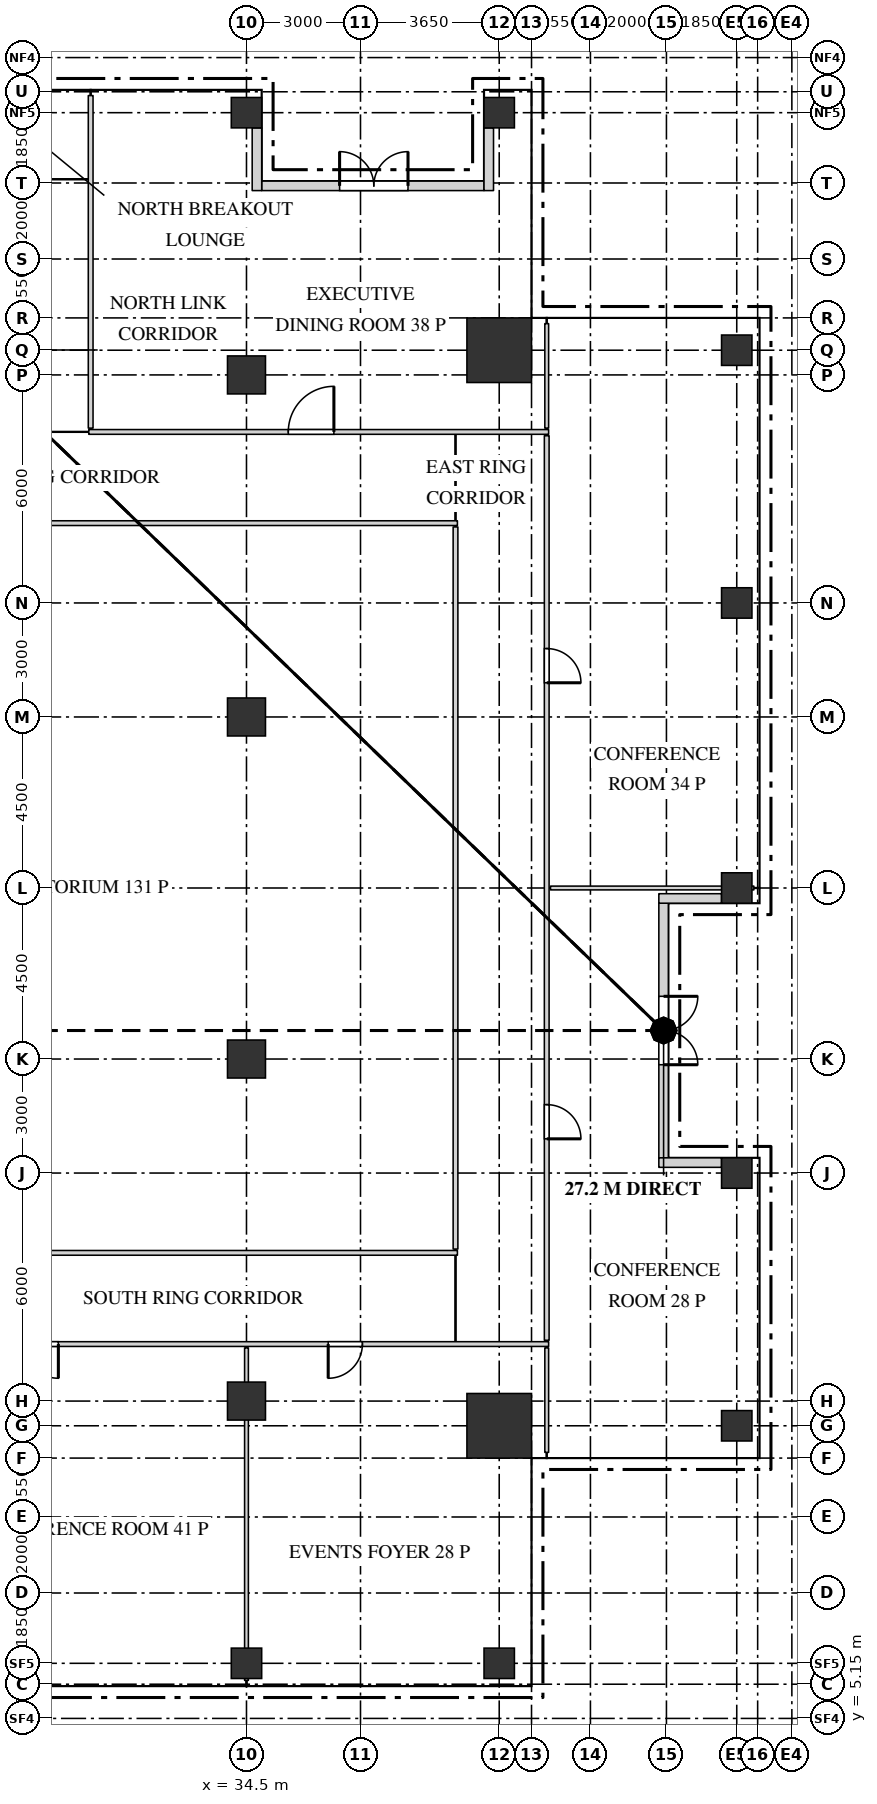
"""IFC4 building model, lengths in metres.
Left out: names, types, materials, properties, quantities, classifications, styles, units other than length and angle.
Written with IfcOpenShell. Run it as: python <this file> out.ifc"""

import sys

from ifc_helpers import new_model, si_unit, direction, frame, frame_2d, origin, origin_2d, place, context, subcontext, project, spatial, rectangle, extrude, source, transform, mapped, element, fill, save


model = new_model("IFC4")
c1 = context("Model", 3, precision=1e-05, world=origin(), true_north=direction((0.0, 1.0)))
c2 = subcontext(c1, "Body", "Model", "MODEL_VIEW")
j1 = project(units=[si_unit("LENGTHUNIT", "METRE"), si_unit("PLANEANGLEUNIT", "RADIAN")], contexts=[c1])
p1 = place(None, origin())
s1 = spatial("IfcSite", under=j1, at=p1, CompositionType="ELEMENT")
p2 = place(p1, origin())
s2 = spatial("IfcBuilding", under=s1, at=p2, CompositionType="ELEMENT")
p3 = place(p2, frame((0.0, 0.0, 318.2)))
s3 = spatial("IfcBuildingStorey", under=s2, at=p3, CompositionType="ELEMENT", Elevation=318.2)
m1 = source(origin(), c2, "Body", "SweptSolid", [
    extrude(rectangle(XDim=1.7, YDim=1.7, at=origin_2d()), origin(), (0.0, 0.0, 1.0), 3.75),
])
for number, where, z_axis, x_axis in (
    (1, (41.15, 41.15, 0.0), (0.0, 0.0, 1.0), (1.0, 0.0, 0.0)),
    (2, (41.15, 12.85, 0.0), (0.0, 0.0, 1.0), (1.0, 0.0, 0.0)),
):
    element("IfcColumn", number, at=place(p3, frame(where, z_axis=z_axis, x_axis=x_axis)), inside=s3, PredefinedType="COLUMN", context=c2, shape_type="MappedRepresentation", body=[
        mapped(m1, transform((0.0, 0.0, 0.0))),
    ])
m2 = source(origin(), c2, "Body", "SweptSolid", [
    extrude(rectangle(XDim=0.8, YDim=0.8, at=origin_2d()), origin(), (0.0, 0.0, 1.0), 3.75),
])
for number, where, z_axis, x_axis in (
    (3, (34.5, 6.6, 0.0), (0.0, 0.0, 1.0), (1.0, 0.0, 0.0)),
    (4, (41.15, 6.6, 0.0), (0.0, 0.0, 1.0), (1.0, 0.0, 0.0)),
    (5, (47.4, 12.85, 0.0), (0.0, 0.0, 1.0), (1.0, 0.0, 0.0)),
    (6, (47.4, 19.5, 0.0), (0.0, 0.0, 1.0), (1.0, 0.0, 0.0)),
    (7, (47.4, 27.0, 0.0), (0.0, 0.0, 1.0), (1.0, 0.0, 0.0)),
    (8, (47.4, 34.5, 0.0), (0.0, 0.0, 1.0), (1.0, 0.0, 0.0)),
    (9, (47.4, 41.15, 0.0), (0.0, 0.0, 1.0), (1.0, 0.0, 0.0)),
    (10, (34.5, 47.4, 0.0), (0.0, 0.0, 1.0), (1.0, 0.0, 0.0)),
    (11, (41.15, 47.4, 0.0), (0.0, 0.0, 1.0), (1.0, 0.0, 0.0)),
):
    element("IfcColumn", number, at=place(p3, frame(where, z_axis=z_axis, x_axis=x_axis)), inside=s3, PredefinedType="COLUMN", context=c2, shape_type="MappedRepresentation", body=[
        mapped(m2, transform((0.0, 0.0, 0.0))),
    ])
m3 = source(origin(), c2, "Body", "SweptSolid", [
    extrude(rectangle(XDim=1.0, YDim=1.0, at=origin_2d()), origin(), (0.0, 0.0, 1.0), 3.75),
])
for number, where, z_axis, x_axis in (
    (12, (34.5, 13.5, 0.0), (0.0, 0.0, 1.0), (1.0, 0.0, 0.0)),
    (13, (34.5, 22.5, 0.0), (0.0, 0.0, 1.0), (1.0, 0.0, 0.0)),
    (14, (34.5, 31.5, 0.0), (0.0, 0.0, 1.0), (1.0, 0.0, 0.0)),
    (15, (34.5, 40.5, 0.0), (0.0, 0.0, 1.0), (1.0, 0.0, 0.0)),
):
    element("IfcColumn", number, at=place(p3, frame(where, z_axis=z_axis, x_axis=x_axis)), inside=s3, PredefinedType="COLUMN", context=c2, shape_type="MappedRepresentation", body=[
        mapped(m3, transform((0.0, 0.0, 0.0))),
    ])
m4 = source(origin(), c2, "Body", "SweptSolid", [
    extrude(rectangle(XDim=6.7, YDim=0.25, at=frame_2d((3.35, 0.0))), origin(), (0.0, 0.0, 1.0), 3.2),
])
p4 = place(p3, frame((45.475, 19.9, 0.0), z_axis=(0.0, 0.0, 1.0), x_axis=(0.0, 1.0, 0.0)))
e16 = element("IfcWall", 16, at=p4, inside=s3, PredefinedType="SOLIDWALL", context=c2, shape_type="MappedRepresentation", body=[
    mapped(m4, transform((0.0, 0.0, 0.0))),
])
m5 = source(origin(), c2, "Body", "SweptSolid", [
    extrude(rectangle(XDim=1.85, YDim=2.4, at=frame_2d((0.925, 1.2))), frame((0.0, 0.135, 0.0), z_axis=(0.0, -1.0, 0.0), x_axis=(1.0, 0.0, 0.0)), (0.0, 0.0, 1.0), 0.27),
])
p5 = place(p4, frame((0.3, 0.0, 0.0)))
e17 = element("IfcOpeningElement", 17, at=p5, cuts=e16, PredefinedType="OPENING", context=c2, shape_type="MappedRepresentation", body=[
    mapped(m5, transform((0.0, 0.0, 0.0))),
])
p6 = place(p4, frame((4.55, 0.0, 0.0)))
e18 = element("IfcOpeningElement", 18, at=p6, cuts=e16, PredefinedType="OPENING", context=c2, shape_type="MappedRepresentation", body=[
    mapped(m5, transform((0.0, 0.0, 0.0))),
])
m6 = source(origin(), c2, "Body", "SweptSolid", [
    extrude(rectangle(XDim=1.8, YDim=2.4, at=frame_2d((0.9, 1.2))), frame((0.0, 0.135, 0.0), z_axis=(0.0, -1.0, 0.0), x_axis=(1.0, 0.0, 0.0)), (0.0, 0.0, 1.0), 0.27),
])
p7 = place(p4, frame((2.45, 0.0, 0.0)))
e19 = element("IfcOpeningElement", 19, at=p7, cuts=e16, PredefinedType="OPENING", context=c2, shape_type="MappedRepresentation", body=[
    mapped(m6, transform((0.0, 0.0, 0.0))),
])
m7 = source(origin(), c2, "Body", "SweptSolid", [
    extrude(rectangle(XDim=1.65, YDim=0.25, at=frame_2d((0.825, 0.0))), origin(), (0.0, 0.0, 1.0), 3.2),
])
for number, where, z_axis, x_axis in (
    (20, (47.0, 19.775, 0.0), (0.0, 0.0, 1.0), (-1.0, 0.0, 0.0)),
    (21, (47.0, 26.725, 0.0), (0.0, 0.0, 1.0), (-1.0, 0.0, 0.0)),
):
    element("IfcWall", number, at=place(p3, frame(where, z_axis=z_axis, x_axis=x_axis)), inside=s3, PredefinedType="SOLIDWALL", context=c2, shape_type="MappedRepresentation", body=[
        mapped(m7, transform((0.0, 0.0, 0.0))),
    ])
m8 = source(origin(), c2, "Body", "SweptSolid", [
    extrude(rectangle(XDim=5.85, YDim=0.25, at=frame_2d((2.925, 0.0))), origin(), (0.0, 0.0, 1.0), 3.75),
])
p8 = place(p3, frame((34.9, 45.475, 0.0), z_axis=(0.0, 0.0, 1.0), x_axis=(1.0, 0.0, 0.0)))
e22 = element("IfcWall", 22, at=p8, inside=s3, PredefinedType="SOLIDWALL", context=c2, shape_type="MappedRepresentation", body=[
    mapped(m8, transform((0.0, 0.0, 0.0))),
])
m9 = source(origin(), c2, "Body", "SweptSolid", [
    extrude(rectangle(XDim=1.4, YDim=2.4, at=frame_2d((0.7, 1.2))), frame((0.0, 0.135, 0.0), z_axis=(0.0, -1.0, 0.0), x_axis=(1.0, 0.0, 0.0)), (0.0, 0.0, 1.0), 0.27),
])
p9 = place(p8, frame((0.35, 0.0, 0.0)))
e23 = element("IfcOpeningElement", 23, at=p9, cuts=e22, PredefinedType="OPENING", context=c2, shape_type="MappedRepresentation", body=[
    mapped(m9, transform((0.0, 0.0, 0.0))),
])
p10 = place(p8, frame((4.15, 0.0, 0.0)))
e24 = element("IfcOpeningElement", 24, at=p10, cuts=e22, PredefinedType="OPENING", context=c2, shape_type="MappedRepresentation", body=[
    mapped(m9, transform((0.0, 0.0, 0.0))),
])
p11 = place(p8, frame((2.05, 0.0, 0.0)))
e25 = element("IfcOpeningElement", 25, at=p11, cuts=e22, PredefinedType="OPENING", context=c2, shape_type="MappedRepresentation", body=[
    mapped(m6, transform((0.0, 0.0, 0.0))),
])
m10 = source(origin(), c2, "Body", "SweptSolid", [
    extrude(rectangle(XDim=1.65, YDim=0.25, at=frame_2d((0.825, 0.0))), origin(), (0.0, 0.0, 1.0), 3.45),
])
for number, where, z_axis, x_axis in (
    (26, (34.775, 47.0, 0.0), (0.0, 0.0, 1.0), (0.0, -1.0, 0.0)),
    (27, (40.875, 47.0, 0.0), (0.0, 0.0, 1.0), (0.0, -1.0, 0.0)),
):
    element("IfcWall", number, at=place(p3, frame(where, z_axis=z_axis, x_axis=x_axis)), inside=s3, PredefinedType="SOLIDWALL", context=c2, shape_type="MappedRepresentation", body=[
        mapped(m10, transform((0.0, 0.0, 0.0))),
    ])
m11 = source(origin(), c2, "Body", "SweptSolid", [
    extrude(rectangle(XDim=8.75, YDim=0.1, at=frame_2d((4.375, 0.0))), origin(), (0.0, 0.0, 1.0), 3.35),
])
p12 = place(p3, frame((34.5, 6.15, 0.0), z_axis=(0.0, 0.0, 1.0), x_axis=(0.0, 1.0, 0.0)))
e28 = element("IfcWall", 28, at=p12, inside=s3, PredefinedType="PARTITIONING", context=c2, shape_type="MappedRepresentation", body=[
    mapped(m11, transform((0.0, 0.0, 0.0))),
])
m12 = source(origin(), c2, "Body", "SweptSolid", [
    extrude(rectangle(XDim=2.75, YDim=0.1, at=frame_2d((1.375, 0.0))), origin(), (0.0, 0.0, 1.0), 3.8),
])
p13 = place(p3, frame((42.4, 12.15, 0.0), z_axis=(0.0, 0.0, 1.0), x_axis=(0.0, 1.0, 0.0)))
e29 = element("IfcWall", 29, at=p13, inside=s3, PredefinedType="PARTITIONING", context=c2, shape_type="MappedRepresentation", body=[
    mapped(m12, transform((0.0, 0.0, 0.0))),
])
m13 = source(origin(), c2, "Body", "SweptSolid", [
    extrude(rectangle(XDim=19.1, YDim=0.125, at=frame_2d((9.55, 0.0))), origin(), (0.0, 0.0, 1.0), 3.8),
])
p14 = place(p3, frame((23.35, 15.0, 0.0), z_axis=(0.0, 0.0, 1.0), x_axis=(1.0, 0.0, 0.0)))
e30 = element("IfcWall", 30, at=p14, inside=s3, PredefinedType="PARTITIONING", context=c2, shape_type="MappedRepresentation", body=[
    mapped(m13, transform((0.0, 0.0, 0.0))),
])
m14 = source(origin(), c2, "Body", "SweptSolid", [
    extrude(rectangle(XDim=0.9, YDim=2.1, at=frame_2d((0.45, 1.05))), frame((0.0, 0.073, 0.0), z_axis=(0.0, -1.0, 0.0), x_axis=(1.0, 0.0, 0.0)), (0.0, 0.0, 1.0), 0.145),
])
p15 = place(p14, frame((5.3, 0.0, 0.0)))
e31 = element("IfcOpeningElement", 31, at=p15, cuts=e30, PredefinedType="OPENING", context=c2, shape_type="MappedRepresentation", body=[
    mapped(m14, transform((0.0, 0.0, 0.0))),
])
p16 = place(p14, frame((13.3, 0.0, 0.0)))
e32 = element("IfcOpeningElement", 32, at=p16, cuts=e30, PredefinedType="OPENING", context=c2, shape_type="MappedRepresentation", body=[
    mapped(m14, transform((0.0, 0.0, 0.0))),
])
m15 = source(origin(), c2, "Body", "SweptSolid", [
    extrude(rectangle(XDim=23.8, YDim=0.125, at=frame_2d((11.9, 0.0))), origin(), (0.0, 0.0, 1.0), 3.8),
])
p17 = place(p3, frame((42.4, 15.1, 0.0), z_axis=(0.0, 0.0, 1.0), x_axis=(0.0, 1.0, 0.0)))
e33 = element("IfcWall", 33, at=p17, inside=s3, PredefinedType="PARTITIONING", context=c2, shape_type="MappedRepresentation", body=[
    mapped(m15, transform((0.0, 0.0, 0.0))),
])
p18 = place(p17, frame((5.3, 0.0, 0.0)))
e34 = element("IfcOpeningElement", 34, at=p18, cuts=e33, PredefinedType="OPENING", context=c2, shape_type="MappedRepresentation", body=[
    mapped(m14, transform((0.0, 0.0, 0.0))),
])
p19 = place(p17, frame((17.3, 0.0, 0.0)))
e35 = element("IfcOpeningElement", 35, at=p19, cuts=e33, PredefinedType="OPENING", context=c2, shape_type="MappedRepresentation", body=[
    mapped(m14, transform((0.0, 0.0, 0.0))),
])
m16 = source(origin(), c2, "Body", "SweptSolid", [
    extrude(rectangle(XDim=16.7, YDim=0.125, at=frame_2d((8.35, 0.0))), origin(), (0.0, 0.0, 1.0), 3.8),
])
p20 = place(p3, frame((23.35, 17.4, 0.0), z_axis=(0.0, 0.0, 1.0), x_axis=(1.0, 0.0, 0.0)))
e36 = element("IfcWall", 36, at=p20, inside=s3, PredefinedType="PARTITIONING", context=c2, shape_type="MappedRepresentation", body=[
    mapped(m16, transform((0.0, 0.0, 0.0))),
])
m17 = source(origin(), c2, "Body", "SweptSolid", [
    extrude(rectangle(XDim=19.0, YDim=0.125, at=frame_2d((9.5, 0.0))), origin(), (0.0, 0.0, 1.0), 3.8),
])
p21 = place(p3, frame((40.0, 17.5, 0.0), z_axis=(0.0, 0.0, 1.0), x_axis=(0.0, 1.0, 0.0)))
e37 = element("IfcWall", 37, at=p21, inside=s3, PredefinedType="PARTITIONING", context=c2, shape_type="MappedRepresentation", body=[
    mapped(m17, transform((0.0, 0.0, 0.0))),
])
m18 = source(origin(), c2, "Body", "SweptSolid", [
    extrude(rectangle(XDim=5.35, YDim=0.1, at=frame_2d((2.675, 0.0))), origin(), (0.0, 0.0, 1.0), 3.8),
])
p22 = place(p3, frame((42.5, 27.0, 0.0), z_axis=(0.0, 0.0, 1.0), x_axis=(1.0, 0.0, 0.0)))
e38 = element("IfcWall", 38, at=p22, inside=s3, PredefinedType="PARTITIONING", context=c2, shape_type="MappedRepresentation", body=[
    mapped(m18, transform((0.0, 0.0, 0.0))),
])
p23 = place(p3, frame((23.35, 36.6, 0.0), z_axis=(0.0, 0.0, 1.0), x_axis=(1.0, 0.0, 0.0)))
e39 = element("IfcWall", 39, at=p23, inside=s3, PredefinedType="PARTITIONING", context=c2, shape_type="MappedRepresentation", body=[
    mapped(m16, transform((0.0, 0.0, 0.0))),
])
m19 = source(origin(), c2, "Body", "SweptSolid", [
    extrude(rectangle(XDim=12.1, YDim=0.125, at=frame_2d((6.05, 0.0))), origin(), (0.0, 0.0, 1.0), 3.8),
])
p24 = place(p3, frame((30.35, 39.0, 0.0), z_axis=(0.0, 0.0, 1.0), x_axis=(1.0, 0.0, 0.0)))
e40 = element("IfcWall", 40, at=p24, inside=s3, PredefinedType="PARTITIONING", context=c2, shape_type="MappedRepresentation", body=[
    mapped(m19, transform((0.0, 0.0, 0.0))),
])
m20 = source(origin(), c2, "Body", "SweptSolid", [
    extrude(rectangle(XDim=1.2, YDim=2.1, at=frame_2d((0.6, 1.05))), frame((0.0, 0.073, 0.0), z_axis=(0.0, -1.0, 0.0), x_axis=(1.0, 0.0, 0.0)), (0.0, 0.0, 1.0), 0.145),
])
p25 = place(p24, frame((5.25, 0.0, 0.0)))
e41 = element("IfcOpeningElement", 41, at=p25, cuts=e40, PredefinedType="OPENING", context=c2, shape_type="MappedRepresentation", body=[
    mapped(m20, transform((0.0, 0.0, 0.0))),
])
m21 = source(origin(), c2, "Body", "SweptSolid", [
    extrude(rectangle(XDim=8.75, YDim=0.125, at=frame_2d((4.375, 0.0))), origin(), (0.0, 0.0, 1.0), 3.8),
])
p26 = place(p3, frame((30.4, 39.1, 0.0), z_axis=(0.0, 0.0, 1.0), x_axis=(0.0, 1.0, 0.0)))
e42 = element("IfcWall", 42, at=p26, inside=s3, PredefinedType="PARTITIONING", context=c2, shape_type="MappedRepresentation", body=[
    mapped(m21, transform((0.0, 0.0, 0.0))),
])
p27 = place(p3, frame((42.4, 39.1, 0.0), z_axis=(0.0, 0.0, 1.0), x_axis=(0.0, 1.0, 0.0)))
e43 = element("IfcWall", 43, at=p27, inside=s3, PredefinedType="PARTITIONING", context=c2, shape_type="MappedRepresentation", body=[
    mapped(m12, transform((0.0, 0.0, 0.0))),
])
m22 = source(origin(), c2, "Body", "SweptSolid", [
    extrude(rectangle(XDim=1.85, YDim=2.4, at=frame_2d((0.925, 1.2))), frame((0.0, 0.03, 0.0), z_axis=(0.0, -1.0, 0.0), x_axis=(1.0, 0.0, 0.0)), (0.0, 0.0, 1.0), 0.06),
])
p28 = place(p5, origin())
e44 = element("IfcWindow", 44, at=p28, inside=s3, PartitioningType="SINGLE_PANEL", PredefinedType="WINDOW", context=c2, shape_type="MappedRepresentation", body=[
    mapped(m22, transform((0.0, 0.0, 0.0))),
])
fill(e17, e44)
p29 = place(p6, origin())
e45 = element("IfcWindow", 45, at=p29, inside=s3, PartitioningType="SINGLE_PANEL", PredefinedType="WINDOW", context=c2, shape_type="MappedRepresentation", body=[
    mapped(m22, transform((0.0, 0.0, 0.0))),
])
fill(e18, e45)
m23 = source(origin(), c2, "Body", "SweptSolid", [
    extrude(rectangle(XDim=1.8, YDim=2.4, at=frame_2d((0.9, 1.2))), frame((0.0, 0.025, 0.0), z_axis=(0.0, -1.0, 0.0), x_axis=(1.0, 0.0, 0.0)), (0.0, 0.0, 1.0), 0.05),
])
p30 = place(p7, origin())
e46 = element("IfcDoor", 46, at=p30, inside=s3, OperationType="DOUBLE_DOOR_DOUBLE_SWING", PredefinedType="DOOR", context=c2, shape_type="MappedRepresentation", body=[
    mapped(m23, transform((0.0, 0.0, 0.0))),
])
fill(e19, e46)
m24 = source(origin(), c2, "Body", "SweptSolid", [
    extrude(rectangle(XDim=1.4, YDim=2.4, at=frame_2d((0.7, 1.2))), frame((0.0, 0.03, 0.0), z_axis=(0.0, -1.0, 0.0), x_axis=(1.0, 0.0, 0.0)), (0.0, 0.0, 1.0), 0.06),
])
p31 = place(p9, origin())
e47 = element("IfcWindow", 47, at=p31, inside=s3, PartitioningType="SINGLE_PANEL", PredefinedType="WINDOW", context=c2, shape_type="MappedRepresentation", body=[
    mapped(m24, transform((0.0, 0.0, 0.0))),
])
fill(e23, e47)
p32 = place(p10, origin())
e48 = element("IfcWindow", 48, at=p32, inside=s3, PartitioningType="SINGLE_PANEL", PredefinedType="WINDOW", context=c2, shape_type="MappedRepresentation", body=[
    mapped(m24, transform((0.0, 0.0, 0.0))),
])
fill(e24, e48)
p33 = place(p11, origin())
e49 = element("IfcDoor", 49, at=p33, inside=s3, OperationType="DOUBLE_DOOR_DOUBLE_SWING", PredefinedType="DOOR", context=c2, shape_type="MappedRepresentation", body=[
    mapped(m23, transform((0.0, 0.0, 0.0))),
])
fill(e25, e49)
m25 = source(origin(), c2, "Body", "SweptSolid", [
    extrude(rectangle(XDim=0.9, YDim=2.1, at=frame_2d((0.45, 1.05))), frame((0.0, 0.025, 0.0), z_axis=(0.0, -1.0, 0.0), x_axis=(1.0, 0.0, 0.0)), (0.0, 0.0, 1.0), 0.05),
])
p34 = place(p15, origin())
e50 = element("IfcDoor", 50, at=p34, inside=s3, OperationType="SINGLE_SWING_RIGHT", PredefinedType="DOOR", context=c2, shape_type="MappedRepresentation", body=[
    mapped(m25, transform((0.0, 0.0, 0.0))),
])
fill(e31, e50)
p35 = place(p16, origin())
e51 = element("IfcDoor", 51, at=p35, inside=s3, OperationType="SINGLE_SWING_LEFT", PredefinedType="DOOR", context=c2, shape_type="MappedRepresentation", body=[
    mapped(m25, transform((0.0, 0.0, 0.0))),
])
fill(e32, e51)
p36 = place(p18, origin())
e52 = element("IfcDoor", 52, at=p36, inside=s3, OperationType="SINGLE_SWING_LEFT", PredefinedType="DOOR", context=c2, shape_type="MappedRepresentation", body=[
    mapped(m25, transform((0.0, 0.0, 0.0))),
])
fill(e34, e52)
p37 = place(p19, origin())
e53 = element("IfcDoor", 53, at=p37, inside=s3, OperationType="SINGLE_SWING_LEFT", PredefinedType="DOOR", context=c2, shape_type="MappedRepresentation", body=[
    mapped(m25, transform((0.0, 0.0, 0.0))),
])
fill(e35, e53)
m26 = source(origin(), c2, "Body", "SweptSolid", [
    extrude(rectangle(XDim=1.2, YDim=2.1, at=frame_2d((0.6, 1.05))), frame((0.0, 0.025, 0.0), z_axis=(0.0, -1.0, 0.0), x_axis=(1.0, 0.0, 0.0)), (0.0, 0.0, 1.0), 0.05),
])
p38 = place(p25, origin())
e54 = element("IfcDoor", 54, at=p38, inside=s3, OperationType="SINGLE_SWING_LEFT", PredefinedType="DOOR", context=c2, shape_type="MappedRepresentation", body=[
    mapped(m26, transform((0.0, 0.0, 0.0))),
])
fill(e41, e54)
save(model, sys.argv[1])
